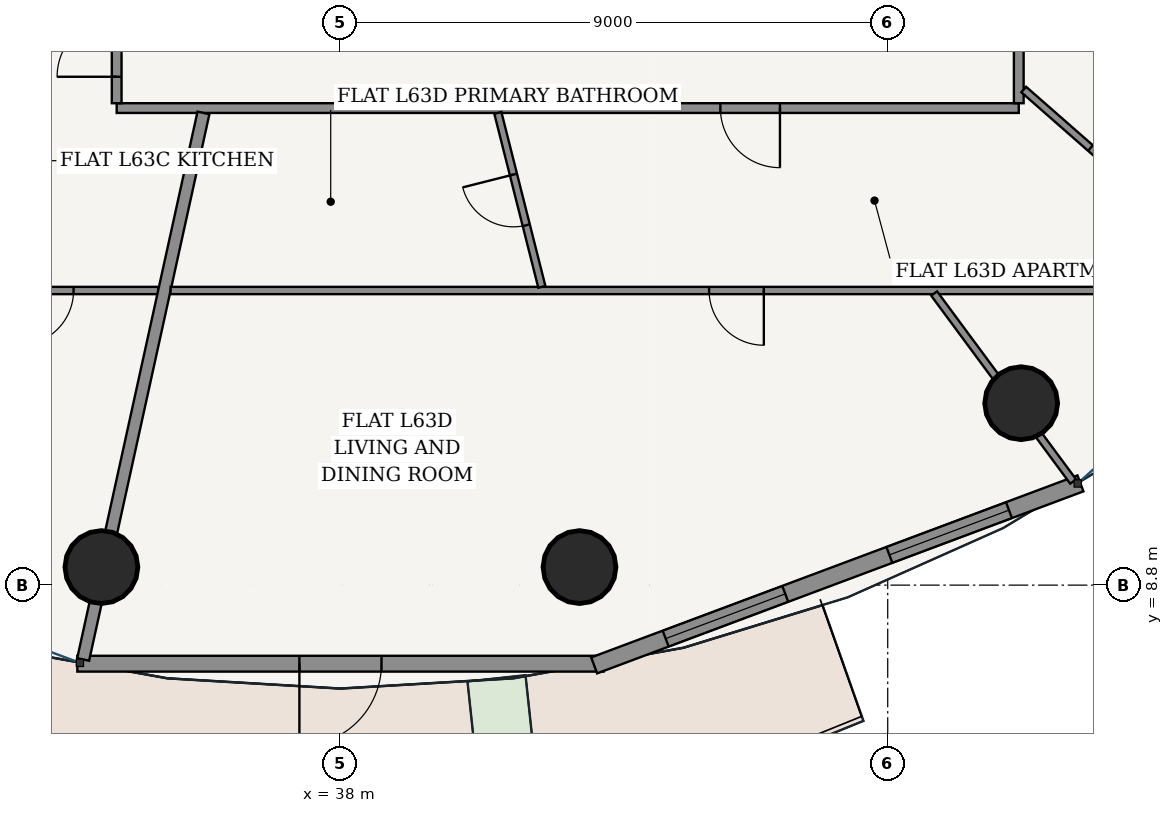
"""IFC4 building model, lengths in metres.
Left out: names, types, materials, properties, quantities, classifications, styles, units other than length and angle.
Written with IfcOpenShell. Run it as: python <this file> out.ifc"""

import sys

from ifc_helpers import new_model, si_unit, direction, frame, frame_2d, origin, origin_2d, place, context, subcontext, project, spatial, rectangle, hollow_circle, extrude, source, transform, mapped, element, fill, save


model = new_model("IFC4")
c1 = context("Model", 3, precision=1e-05, world=origin(), true_north=direction((-0.2419218956, 0.970295726276)))
c2 = subcontext(c1, "Body", "Model", "MODEL_VIEW")
j1 = project(units=[si_unit("LENGTHUNIT", "METRE"), si_unit("PLANEANGLEUNIT", "RADIAN")], contexts=[c1])
p1 = place(None, origin())
s1 = spatial("IfcSite", under=j1, at=p1, CompositionType="ELEMENT")
p2 = place(p1, origin())
s2 = spatial("IfcBuilding", under=s1, at=p2, CompositionType="ELEMENT")
p3 = place(p2, frame((0.0, 0.0, 239.3)))
s3 = spatial("IfcBuildingStorey", under=s2, at=p3, CompositionType="ELEMENT", Elevation=239.3)
for number, where, z_axis, x_axis in (
    (1, (34.069, 9.097, 0.0), (0.0, 0.0, 1.0), (1.0, 0.0, 0.0)),
    (2, (41.931, 9.097, 0.0), (0.0, 0.0, 1.0), (1.0, 0.0, 0.0)),
    (3, (49.195, 11.792, 0.0), (0.0, 0.0, 1.0), (1.0, 0.0, 0.0)),
):
    element("IfcColumn", number, at=place(p3, frame(where, z_axis=z_axis, x_axis=x_axis)), inside=s3, PredefinedType="COLUMN", context=c2, shape_type="SweptSolid", body=[
        extrude(hollow_circle(Radius=0.6, WallThickness=0.038, at=origin_2d()), origin(), (0.0, 0.0, 1.0), 3.7),
    ])
p4 = place(p3, frame((33.673, 7.508, 0.0), z_axis=(0.0, 0.0, 1.0), x_axis=(1.0, 0.0, 0.0)))
e4 = element("IfcWall", 4, at=p4, inside=s3, PredefinedType="SOLIDWALL", context=c2, shape_type="SweptSolid", body=[
    extrude(rectangle(XDim=8.654, YDim=0.26, at=frame_2d((4.327, 0.0))), origin(), (0.0, 0.0, 1.0), 3.25),
])
p5 = place(p4, frame((3.652, 0.0, 0.0)))
e5 = element("IfcOpeningElement", 5, at=p5, cuts=e4, PredefinedType="OPENING", context=c2, shape_type="SweptSolid", body=[
    extrude(rectangle(XDim=1.35, YDim=2.2, at=frame_2d((0.675, 1.1))), frame((0.0, 0.14, 0.0), z_axis=(0.0, -1.0, 0.0), x_axis=(1.0, 0.0, 0.0)), (0.0, 0.0, 1.0), 0.28),
])
p6 = place(p3, frame((42.172, 7.48, 0.0), z_axis=(0.0, 0.0, 1.0), x_axis=(0.936556918375, 0.350515532672, 0.0)))
e6 = element("IfcWall", 6, at=p6, inside=s3, PredefinedType="SOLIDWALL", context=c2, shape_type="SweptSolid", body=[
    extrude(rectangle(XDim=8.539, YDim=0.28, at=frame_2d((4.27, 0.0))), origin(), (0.0, 0.0, 1.0), 3.25),
])
p7 = place(p6, frame((1.256, 0.0, 0.85)))
e7 = element("IfcOpeningElement", 7, at=p7, cuts=e6, PredefinedType="OPENING", context=c2, shape_type="SweptSolid", body=[
    extrude(rectangle(XDim=2.1, YDim=1.95, at=frame_2d((1.05, 0.975))), frame((0.0, 0.15, 0.0), z_axis=(0.0, -1.0, 0.0), x_axis=(1.0, 0.0, 0.0)), (0.0, 0.0, 1.0), 0.3),
])
p8 = place(p6, frame((5.184, 0.0, 0.85)))
e8 = element("IfcOpeningElement", 8, at=p8, cuts=e6, PredefinedType="OPENING", context=c2, shape_type="SweptSolid", body=[
    extrude(rectangle(XDim=2.1, YDim=1.95, at=frame_2d((1.05, 0.975))), frame((0.0, 0.15, 0.0), z_axis=(0.0, -1.0, 0.0), x_axis=(1.0, 0.0, 0.0)), (0.0, 0.0, 1.0), 0.3),
])
p9 = place(p3, frame((34.32, 16.645, 0.0), z_axis=(0.0, 0.0, 1.0), x_axis=(1.0, 0.0, 0.0)))
e9 = element("IfcWall", 9, at=p9, inside=s3, PredefinedType="PARTITIONING", context=c2, shape_type="SweptSolid", body=[
    extrude(rectangle(XDim=14.835, YDim=0.16, at=frame_2d((7.417, 0.0))), origin(), (0.0, 0.0, 1.0), 2.775),
])
p10 = place(p9, frame((9.928, 0.0, 0.0)))
e10 = element("IfcOpeningElement", 10, at=p10, cuts=e9, PredefinedType="OPENING", context=c2, shape_type="SweptSolid", body=[
    extrude(rectangle(XDim=0.98, YDim=2.2, at=frame_2d((0.49, 1.1))), frame((0.0, 0.09, 0.0), z_axis=(0.0, -1.0, 0.0), x_axis=(1.0, 0.0, 0.0)), (0.0, 0.0, 1.0), 0.18),
])
p11 = place(p3, frame((34.32, 16.725, 0.0), z_axis=(0.0, 0.0, 1.0), x_axis=(0.0, 1.0, 0.0)))
e11 = element("IfcWall", 11, at=p11, inside=s3, PredefinedType="PARTITIONING", context=c2, shape_type="SweptSolid", body=[
    extrude(rectangle(XDim=1.85, YDim=0.16, at=frame_2d((0.925, 0.0))), origin(), (0.0, 0.0, 1.0), 3.25),
])
p12 = place(p11, frame((0.435, 0.0, 0.0)))
e12 = element("IfcOpeningElement", 12, at=p12, cuts=e11, PredefinedType="OPENING", context=c2, shape_type="SweptSolid", body=[
    extrude(rectangle(XDim=0.98, YDim=2.2, at=frame_2d((0.49, 1.1))), frame((0.0, 0.09, 0.0), z_axis=(0.0, -1.0, 0.0), x_axis=(1.0, 0.0, 0.0)), (0.0, 0.0, 1.0), 0.18),
])
p13 = place(p3, frame((49.155, 16.725, 0.0), z_axis=(0.0, 0.0, 1.0), x_axis=(0.0, 1.0, 0.0)))
e13 = element("IfcWall", 13, at=p13, inside=s3, PredefinedType="PARTITIONING", context=c2, shape_type="SweptSolid", body=[
    extrude(rectangle(XDim=18.3, YDim=0.16, at=frame_2d((9.15, 0.0))), origin(), (0.0, 0.0, 1.0), 2.775),
])
p14 = place(p13, frame((7.401, 0.0, 0.0)))
e14 = element("IfcOpeningElement", 14, at=p14, cuts=e13, PredefinedType="OPENING", context=c2, shape_type="SweptSolid", body=[
    extrude(rectangle(XDim=0.98, YDim=2.2, at=frame_2d((0.49, 1.1))), frame((0.0, 0.09, 0.0), z_axis=(0.0, -1.0, 0.0), x_axis=(1.0, 0.0, 0.0)), (0.0, 0.0, 1.0), 0.18),
])
p15 = place(p3, frame((35.002, 13.645, 0.0), z_axis=(0.0, 0.0, 1.0), x_axis=(-1.0, 0.0, 0.0)))
e15 = element("IfcWall", 15, at=p15, inside=s3, PredefinedType="PARTITIONING", context=c2, shape_type="SweptSolid", body=[
    extrude(rectangle(XDim=3.682, YDim=0.12, at=frame_2d((1.841, 0.0))), origin(), (0.0, 0.0, 1.0), 3.25),
])
p16 = place(p15, frame((1.391, 0.0, 0.0)))
e16 = element("IfcOpeningElement", 16, at=p16, cuts=e15, PredefinedType="OPENING", context=c2, shape_type="SweptSolid", body=[
    extrude(rectangle(XDim=0.9, YDim=2.15, at=frame_2d((0.45, 1.075))), frame((0.0, 0.07, 0.0), z_axis=(0.0, -1.0, 0.0), x_axis=(1.0, 0.0, 0.0)), (0.0, 0.0, 1.0), 0.14),
])
p17 = place(p3, frame((35.747, 16.565, 0.0), z_axis=(0.0, 0.0, 1.0), x_axis=(-0.214957946814, -0.976623305631, 0.0)))
e17 = element("IfcWall", 17, at=p17, inside=s3, PredefinedType="PARTITIONING", context=c2, shape_type="SweptSolid", body=[
    extrude(rectangle(XDim=9.202, YDim=0.2, at=frame_2d((4.601, 0.0))), origin(), (0.0, 0.0, 1.0), 2.6),
])
p18 = place(p3, frame((52.155, 13.645, 0.0), z_axis=(0.0, 0.0, 1.0), x_axis=(-1.0, 0.0, 0.0)))
e18 = element("IfcWall", 18, at=p18, inside=s3, PredefinedType="PARTITIONING", context=c2, shape_type="SweptSolid", body=[
    extrude(rectangle(XDim=16.949, YDim=0.12, at=frame_2d((8.474, 0.0))), origin(), (0.0, 0.0, 1.0), 2.775),
])
p19 = place(p18, frame((7.192, 0.0, 0.0)))
e19 = element("IfcOpeningElement", 19, at=p19, cuts=e18, PredefinedType="OPENING", context=c2, shape_type="SweptSolid", body=[
    extrude(rectangle(XDim=0.9, YDim=2.15, at=frame_2d((0.45, 1.075))), frame((0.0, 0.07, 0.0), z_axis=(0.0, -1.0, 0.0), x_axis=(1.0, 0.0, 0.0)), (0.0, 0.0, 1.0), 0.14),
])
p20 = place(p3, frame((47.764, 13.595, 0.0), z_axis=(0.0, 0.0, 1.0), x_axis=(0.594530312724, -0.804073197696, 0.0)))
e20 = element("IfcWall", 20, at=p20, inside=s3, PredefinedType="PARTITIONING", context=c2, shape_type="SweptSolid", body=[
    extrude(rectangle(XDim=3.845, YDim=0.12, at=frame_2d((1.922, 0.0))), origin(), (0.0, 0.0, 1.0), 2.6),
])
p21 = place(p3, frame((40.589, 16.565, 0.0), z_axis=(0.0, 0.0, 1.0), x_axis=(0.245222005641, -0.969466950416, 0.0)))
e21 = element("IfcWall", 21, at=p21, inside=s3, PredefinedType="PARTITIONING", context=c2, shape_type="SweptSolid", body=[
    extrude(rectangle(XDim=2.95, YDim=0.12, at=frame_2d((1.475, 0.0))), origin(), (0.0, 0.0, 1.0), 2.969),
])
p22 = place(p21, frame((1.045, 0.0, 0.0)))
e22 = element("IfcOpeningElement", 22, at=p22, cuts=e21, PredefinedType="OPENING", context=c2, shape_type="SweptSolid", body=[
    extrude(rectangle(XDim=0.86, YDim=2.15, at=frame_2d((0.43, 1.075))), frame((0.0, 0.07, 0.0), z_axis=(0.0, -1.0, 0.0), x_axis=(1.0, 0.0, 0.0)), (0.0, 0.0, 1.0), 0.14),
])
p23 = place(p3, frame((49.237, 16.95, 0.0), z_axis=(0.0, 0.0, 1.0), x_axis=(0.751994252696, -0.659169662463, 0.0)))
e23 = element("IfcWall", 23, at=p23, inside=s3, PredefinedType="PARTITIONING", context=c2, shape_type="SweptSolid", body=[
    extrude(rectangle(XDim=3.819, YDim=0.12, at=frame_2d((1.909, 0.0))), origin(), (0.0, 0.0, 1.0), 2.881),
])
p24 = place(p23, frame((1.459, 0.0, 0.0)))
e24 = element("IfcOpeningElement", 24, at=p24, cuts=e23, PredefinedType="OPENING", context=c2, shape_type="SweptSolid", body=[
    extrude(rectangle(XDim=0.9, YDim=2.15, at=frame_2d((0.45, 1.075))), frame((0.0, 0.07, 0.0), z_axis=(0.0, -1.0, 0.0), x_axis=(1.0, 0.0, 0.0)), (0.0, 0.0, 1.0), 0.14),
])
m1 = source(origin(), c2, "Body", "SweptSolid", [
    extrude(rectangle(XDim=1.35, YDim=2.2, at=frame_2d((0.675, 1.1))), frame((0.0, 0.025, 0.0), z_axis=(0.0, -1.0, 0.0), x_axis=(1.0, 0.0, 0.0)), (0.0, 0.0, 1.0), 0.05),
])
p25 = place(p5, frame((1.35, 0.0, 0.0), z_axis=(0.0, 0.0, 1.0), x_axis=(-1.0, 0.0, 0.0)))
e25 = element("IfcDoor", 25, at=p25, inside=s3, OperationType="SINGLE_SWING_RIGHT", PredefinedType="DOOR", context=c2, shape_type="MappedRepresentation", body=[
    mapped(m1, transform((0.0, 0.0, 0.0), scale=1.0)),
])
fill(e5, e25)
m2 = source(origin(), c2, "Body", "SweptSolid", [
    extrude(rectangle(XDim=2.1, YDim=1.95, at=frame_2d((1.05, 0.975))), frame((0.0, 0.03, 0.0), z_axis=(0.0, -1.0, 0.0), x_axis=(1.0, 0.0, 0.0)), (0.0, 0.0, 1.0), 0.06),
])
p26 = place(p7, origin())
e26 = element("IfcWindow", 26, at=p26, inside=s3, PartitioningType="SINGLE_PANEL", PredefinedType="WINDOW", context=c2, shape_type="MappedRepresentation", body=[
    mapped(m2, transform((0.0, 0.0, 0.0), scale=1.0)),
])
fill(e7, e26)
p27 = place(p8, origin())
e27 = element("IfcWindow", 27, at=p27, inside=s3, PartitioningType="SINGLE_PANEL", PredefinedType="WINDOW", context=c2, shape_type="MappedRepresentation", body=[
    mapped(m2, transform((0.0, 0.0, 0.0), scale=1.0)),
])
fill(e8, e27)
m3 = source(origin(), c2, "Body", "SweptSolid", [
    extrude(rectangle(XDim=0.98, YDim=2.2, at=frame_2d((0.49, 1.1))), frame((0.0, 0.025, 0.0), z_axis=(0.0, -1.0, 0.0), x_axis=(1.0, 0.0, 0.0)), (0.0, 0.0, 1.0), 0.05),
])
p28 = place(p12, origin())
e28 = element("IfcDoor", 28, at=p28, inside=s3, OperationType="SINGLE_SWING_LEFT", PredefinedType="DOOR", context=c2, shape_type="MappedRepresentation", body=[
    mapped(m3, transform((0.0, 0.0, 0.0), scale=1.0)),
])
fill(e12, e28)
m4 = source(origin(), c2, "Body", "SweptSolid", [
    extrude(rectangle(XDim=0.9, YDim=2.15, at=frame_2d((0.45, 1.075))), frame((0.0, 0.025, 0.0), z_axis=(0.0, -1.0, 0.0), x_axis=(1.0, 0.0, 0.0)), (0.0, 0.0, 1.0), 0.05),
])
p29 = place(p16, origin())
e29 = element("IfcDoor", 29, at=p29, inside=s3, OperationType="SINGLE_SWING_RIGHT", PredefinedType="DOOR", context=c2, shape_type="MappedRepresentation", body=[
    mapped(m4, transform((0.0, 0.0, 0.0), scale=1.0)),
])
fill(e16, e29)
p30 = place(p10, frame((0.98, 0.0, 0.0), z_axis=(0.0, 0.0, 1.0), x_axis=(-1.0, 0.0, 0.0)))
e30 = element("IfcDoor", 30, at=p30, inside=s3, OperationType="SINGLE_SWING_LEFT", PredefinedType="DOOR", context=c2, shape_type="MappedRepresentation", body=[
    mapped(m3, transform((0.0, 0.0, 0.0), scale=1.0)),
])
fill(e10, e30)
m5 = source(origin(), c2, "Body", "SweptSolid", [
    extrude(rectangle(XDim=0.86, YDim=2.15, at=frame_2d((0.43, 1.075))), frame((0.0, 0.025, 0.0), z_axis=(0.0, -1.0, 0.0), x_axis=(1.0, 0.0, 0.0)), (0.0, 0.0, 1.0), 0.05),
])
p31 = place(p22, frame((0.86, 0.0, 0.0), z_axis=(0.0, 0.0, 1.0), x_axis=(-1.0, 0.0, 0.0)))
e31 = element("IfcDoor", 31, at=p31, inside=s3, OperationType="SINGLE_SWING_RIGHT", PredefinedType="DOOR", context=c2, shape_type="MappedRepresentation", body=[
    mapped(m5, transform((0.0, 0.0, 0.0), scale=1.0)),
])
fill(e22, e31)
p32 = place(p19, origin())
e32 = element("IfcDoor", 32, at=p32, inside=s3, OperationType="SINGLE_SWING_LEFT", PredefinedType="DOOR", context=c2, shape_type="MappedRepresentation", body=[
    mapped(m4, transform((0.0, 0.0, 0.0), scale=1.0)),
])
fill(e19, e32)
p33 = place(p24, origin())
e33 = element("IfcDoor", 33, at=p33, inside=s3, OperationType="SINGLE_SWING_RIGHT", PredefinedType="DOOR", context=c2, shape_type="MappedRepresentation", body=[
    mapped(m4, transform((0.0, 0.0, 0.0), scale=1.0)),
])
fill(e24, e33)
save(model, sys.argv[1])
